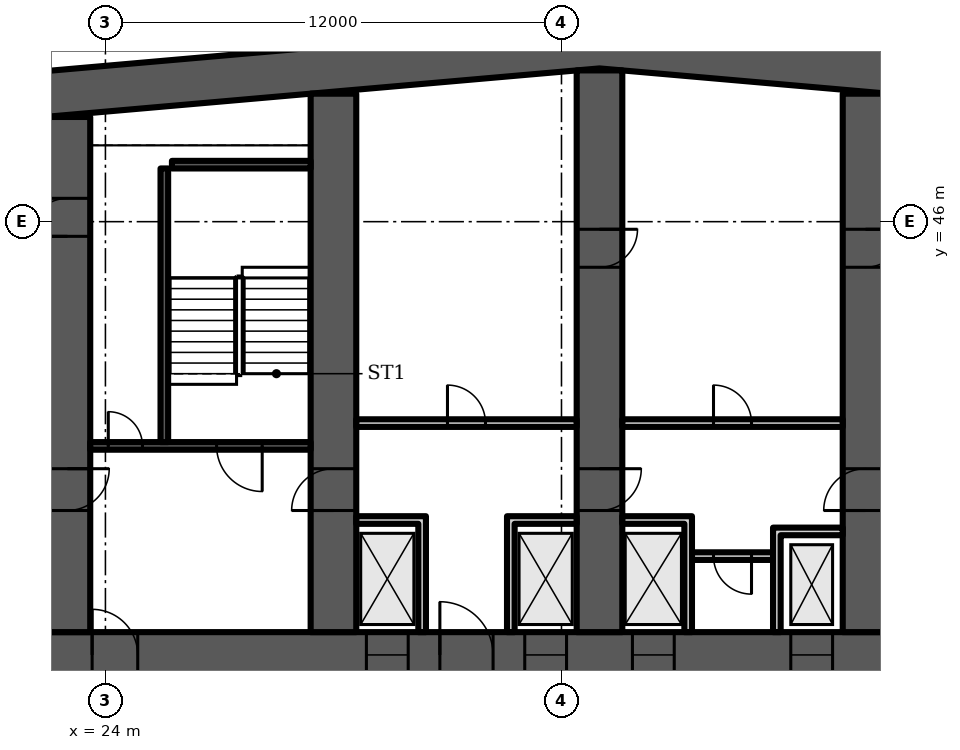
"""IFC4 building model, lengths in metres.
Left out: names, types, materials, properties, quantities, classifications, styles, units other than length and angle.
Written with IfcOpenShell. Run it as: python <this file> out.ifc"""

import sys

from ifc_helpers import new_model, si_unit, direction, frame, frame_2d, origin, place, context, subcontext, project, spatial, polyline, rectangle, outline, extrude, element, fill, save


model = new_model("IFC4")
c1 = context("Model", 3, precision=1e-05, world=origin(), true_north=direction((0.0, 1.0)))
c2 = subcontext(c1, "Body", "Model", "MODEL_VIEW")
j1 = project(units=[si_unit("LENGTHUNIT", "METRE"), si_unit("PLANEANGLEUNIT", "RADIAN")], contexts=[c1])
p1 = place(None, origin())
s1 = spatial("IfcSite", under=j1, at=p1, CompositionType="ELEMENT")
p2 = place(p1, origin())
s2 = spatial("IfcBuilding", under=s1, at=p2, CompositionType="ELEMENT")
p3 = place(p2, frame((0.0, 0.0, 66.7)))
s3 = spatial("IfcBuildingStorey", under=s2, at=p3, CompositionType="ELEMENT", Elevation=66.7)
p4 = place(p3, origin())
e1 = element("IfcWall", 1, at=p4, inside=s3, PredefinedType="SHEAR", context=c2, shape_type="SweptSolid", body=[
    extrude(outline(polyline([(9.0, 47.583), (37.0, 50.032), (65.0, 47.583), (65.0, 48.787), (37.0, 51.237), (9.0, 48.787), (9.0, 47.583)])), origin(), (0.0, 0.0, 1.0), 3.6),
])
p5 = place(p3, frame((9.0, 34.6, 0.0), z_axis=(0.0, 0.0, 1.0), x_axis=(1.0, 0.0, 0.0)))
e2 = element("IfcWall", 2, at=p5, inside=s3, PredefinedType="SHEAR", context=c2, shape_type="SweptSolid", body=[
    extrude(rectangle(XDim=56.0, YDim=1.2, at=frame_2d((28.0, 0.0))), origin(), (0.0, 0.0, 1.0), 3.6),
])
p6 = place(p5, frame((2.0, 0.0, 0.0)))
e3 = element("IfcOpeningElement", 3, at=p6, cuts=e2, PredefinedType="OPENING", context=c2, shape_type="SweptSolid", body=[
    extrude(rectangle(XDim=1.0, YDim=2.1, at=frame_2d((0.5, 1.05))), frame((0.0, 0.61, 0.0), z_axis=(0.0, -1.0, 0.0), x_axis=(1.0, 0.0, 0.0)), (0.0, 0.0, 1.0), 1.22),
])
p7 = place(p5, frame((4.6, 0.0, 0.0)))
e4 = element("IfcOpeningElement", 4, at=p7, cuts=e2, PredefinedType="OPENING", context=c2, shape_type="SweptSolid", body=[
    extrude(rectangle(XDim=1.0, YDim=2.1, at=frame_2d((0.5, 1.05))), frame((0.0, 0.61, 0.0), z_axis=(0.0, -1.0, 0.0), x_axis=(1.0, 0.0, 0.0)), (0.0, 0.0, 1.0), 1.22),
])
p8 = place(p5, frame((7.867, 0.0, 0.0)))
e5 = element("IfcOpeningElement", 5, at=p8, cuts=e2, PredefinedType="OPENING", context=c2, shape_type="SweptSolid", body=[
    extrude(rectangle(XDim=1.1, YDim=2.1, at=frame_2d((0.55, 1.05))), frame((0.0, 0.61, 0.0), z_axis=(0.0, -1.0, 0.0), x_axis=(1.0, 0.0, 0.0)), (0.0, 0.0, 1.0), 1.22),
])
p9 = place(p5, frame((12.033, 0.0, 0.0)))
e6 = element("IfcOpeningElement", 6, at=p9, cuts=e2, PredefinedType="OPENING", context=c2, shape_type="SweptSolid", body=[
    extrude(rectangle(XDim=1.1, YDim=2.1, at=frame_2d((0.55, 1.05))), frame((0.0, 0.61, 0.0), z_axis=(0.0, -1.0, 0.0), x_axis=(1.0, 0.0, 0.0)), (0.0, 0.0, 1.0), 1.22),
])
p10 = place(p5, frame((9.8, 0.0, 0.0)))
e7 = element("IfcOpeningElement", 7, at=p10, cuts=e2, PredefinedType="OPENING", context=c2, shape_type="SweptSolid", body=[
    extrude(rectangle(XDim=1.4, YDim=2.1, at=frame_2d((0.7, 1.05))), frame((0.0, 0.61, 0.0), z_axis=(0.0, -1.0, 0.0), x_axis=(1.0, 0.0, 0.0)), (0.0, 0.0, 1.0), 1.22),
])
p11 = place(p5, frame((14.65, 0.0, 0.0)))
e8 = element("IfcOpeningElement", 8, at=p11, cuts=e2, PredefinedType="OPENING", context=c2, shape_type="SweptSolid", body=[
    extrude(rectangle(XDim=1.2, YDim=2.1, at=frame_2d((0.6, 1.05))), frame((0.0, 0.61, 0.0), z_axis=(0.0, -1.0, 0.0), x_axis=(1.0, 0.0, 0.0)), (0.0, 0.0, 1.0), 1.22),
])
p12 = place(p5, frame((21.867, 0.0, 0.0)))
e9 = element("IfcOpeningElement", 9, at=p12, cuts=e2, PredefinedType="OPENING", context=c2, shape_type="SweptSolid", body=[
    extrude(rectangle(XDim=1.1, YDim=2.1, at=frame_2d((0.55, 1.05))), frame((0.0, 0.61, 0.0), z_axis=(0.0, -1.0, 0.0), x_axis=(1.0, 0.0, 0.0)), (0.0, 0.0, 1.0), 1.22),
])
p13 = place(p5, frame((26.033, 0.0, 0.0)))
e10 = element("IfcOpeningElement", 10, at=p13, cuts=e2, PredefinedType="OPENING", context=c2, shape_type="SweptSolid", body=[
    extrude(rectangle(XDim=1.1, YDim=2.1, at=frame_2d((0.55, 1.05))), frame((0.0, 0.61, 0.0), z_axis=(0.0, -1.0, 0.0), x_axis=(1.0, 0.0, 0.0)), (0.0, 0.0, 1.0), 1.22),
])
p14 = place(p5, frame((23.8, 0.0, 0.0)))
e11 = element("IfcOpeningElement", 11, at=p14, cuts=e2, PredefinedType="OPENING", context=c2, shape_type="SweptSolid", body=[
    extrude(rectangle(XDim=1.4, YDim=2.1, at=frame_2d((0.7, 1.05))), frame((0.0, 0.61, 0.0), z_axis=(0.0, -1.0, 0.0), x_axis=(1.0, 0.0, 0.0)), (0.0, 0.0, 1.0), 1.22),
])
p15 = place(p5, frame((28.867, 0.0, 0.0)))
e12 = element("IfcOpeningElement", 12, at=p15, cuts=e2, PredefinedType="OPENING", context=c2, shape_type="SweptSolid", body=[
    extrude(rectangle(XDim=1.1, YDim=2.1, at=frame_2d((0.55, 1.05))), frame((0.0, 0.61, 0.0), z_axis=(0.0, -1.0, 0.0), x_axis=(1.0, 0.0, 0.0)), (0.0, 0.0, 1.0), 1.22),
])
p16 = place(p5, frame((33.033, 0.0, 0.0)))
e13 = element("IfcOpeningElement", 13, at=p16, cuts=e2, PredefinedType="OPENING", context=c2, shape_type="SweptSolid", body=[
    extrude(rectangle(XDim=1.1, YDim=2.1, at=frame_2d((0.55, 1.05))), frame((0.0, 0.61, 0.0), z_axis=(0.0, -1.0, 0.0), x_axis=(1.0, 0.0, 0.0)), (0.0, 0.0, 1.0), 1.22),
])
p17 = place(p5, frame((40.15, 0.0, 0.0)))
e14 = element("IfcOpeningElement", 14, at=p17, cuts=e2, PredefinedType="OPENING", context=c2, shape_type="SweptSolid", body=[
    extrude(rectangle(XDim=1.2, YDim=2.1, at=frame_2d((0.6, 1.05))), frame((0.0, 0.61, 0.0), z_axis=(0.0, -1.0, 0.0), x_axis=(1.0, 0.0, 0.0)), (0.0, 0.0, 1.0), 1.22),
])
p18 = place(p5, frame((44.8, 0.0, 0.0)))
e15 = element("IfcOpeningElement", 15, at=p18, cuts=e2, PredefinedType="OPENING", context=c2, shape_type="SweptSolid", body=[
    extrude(rectangle(XDim=1.4, YDim=2.1, at=frame_2d((0.7, 1.05))), frame((0.0, 0.61, 0.0), z_axis=(0.0, -1.0, 0.0), x_axis=(1.0, 0.0, 0.0)), (0.0, 0.0, 1.0), 1.22),
])
p19 = place(p5, frame((49.867, 0.0, 0.0)))
e16 = element("IfcOpeningElement", 16, at=p19, cuts=e2, PredefinedType="OPENING", context=c2, shape_type="SweptSolid", body=[
    extrude(rectangle(XDim=1.1, YDim=2.1, at=frame_2d((0.55, 1.05))), frame((0.0, 0.61, 0.0), z_axis=(0.0, -1.0, 0.0), x_axis=(1.0, 0.0, 0.0)), (0.0, 0.0, 1.0), 1.22),
])
p20 = place(p5, frame((53.5, 0.0, 0.0)))
e17 = element("IfcOpeningElement", 17, at=p20, cuts=e2, PredefinedType="OPENING", context=c2, shape_type="SweptSolid", body=[
    extrude(rectangle(XDim=1.1, YDim=2.1, at=frame_2d((0.55, 1.05))), frame((0.0, 0.61, 0.0), z_axis=(0.0, -1.0, 0.0), x_axis=(1.0, 0.0, 0.0)), (0.0, 0.0, 1.0), 1.22),
])
p21 = place(p5, frame((51.567, 0.0, 0.0)))
e18 = element("IfcOpeningElement", 18, at=p21, cuts=e2, PredefinedType="OPENING", context=c2, shape_type="SweptSolid", body=[
    extrude(rectangle(XDim=1.4, YDim=2.1, at=frame_2d((0.7, 1.05))), frame((0.0, 0.61, 0.0), z_axis=(0.0, -1.0, 0.0), x_axis=(1.0, 0.0, 0.0)), (0.0, 0.0, 1.0), 1.22),
])
p22 = place(p3, frame((23.0, 35.2, 0.0), z_axis=(0.0, 0.0, 1.0), x_axis=(0.0, 1.0, 0.0)))
e19 = element("IfcWall", 19, at=p22, inside=s3, PredefinedType="SHEAR", context=c2, shape_type="SweptSolid", body=[
    extrude(rectangle(XDim=13.555, YDim=1.2, at=frame_2d((6.778, 0.0))), origin(), (0.0, 0.0, 1.0), 3.6),
])
p23 = place(p22, frame((10.414, 0.0, 0.0)))
e20 = element("IfcOpeningElement", 20, at=p23, cuts=e19, PredefinedType="OPENING", context=c2, shape_type="SweptSolid", body=[
    extrude(rectangle(XDim=1.0, YDim=2.1, at=frame_2d((0.5, 1.05))), frame((0.0, 0.61, 0.0), z_axis=(0.0, -1.0, 0.0), x_axis=(1.0, 0.0, 0.0)), (0.0, 0.0, 1.0), 1.22),
])
p24 = place(p22, frame((3.2, 0.0, 0.0)))
e21 = element("IfcOpeningElement", 21, at=p24, cuts=e19, PredefinedType="OPENING", context=c2, shape_type="SweptSolid", body=[
    extrude(rectangle(XDim=1.1, YDim=2.1, at=frame_2d((0.55, 1.05))), frame((0.0, 0.61, 0.0), z_axis=(0.0, -1.0, 0.0), x_axis=(1.0, 0.0, 0.0)), (0.0, 0.0, 1.0), 1.22),
])
p25 = place(p3, frame((30.0, 35.2, 0.0), z_axis=(0.0, 0.0, 1.0), x_axis=(0.0, 1.0, 0.0)))
e22 = element("IfcWall", 22, at=p25, inside=s3, PredefinedType="SHEAR", context=c2, shape_type="SweptSolid", body=[
    extrude(rectangle(XDim=14.168, YDim=1.2, at=frame_2d((7.084, 0.0))), origin(), (0.0, 0.0, 1.0), 3.6),
])
p26 = place(p25, frame((3.2, 0.0, 0.0)))
e23 = element("IfcOpeningElement", 23, at=p26, cuts=e22, PredefinedType="OPENING", context=c2, shape_type="SweptSolid", body=[
    extrude(rectangle(XDim=1.1, YDim=2.1, at=frame_2d((0.55, 1.05))), frame((0.0, 0.61, 0.0), z_axis=(0.0, -1.0, 0.0), x_axis=(1.0, 0.0, 0.0)), (0.0, 0.0, 1.0), 1.22),
])
p27 = place(p3, frame((37.0, 35.2, 0.0), z_axis=(0.0, 0.0, 1.0), x_axis=(0.0, 1.0, 0.0)))
e24 = element("IfcWall", 24, at=p27, inside=s3, PredefinedType="SHEAR", context=c2, shape_type="SweptSolid", body=[
    extrude(rectangle(XDim=14.78, YDim=1.2, at=frame_2d((7.39, 0.0))), origin(), (0.0, 0.0, 1.0), 3.6),
])
p28 = place(p27, frame((3.2, 0.0, 0.0)))
e25 = element("IfcOpeningElement", 25, at=p28, cuts=e24, PredefinedType="OPENING", context=c2, shape_type="SweptSolid", body=[
    extrude(rectangle(XDim=1.1, YDim=2.1, at=frame_2d((0.55, 1.05))), frame((0.0, 0.61, 0.0), z_axis=(0.0, -1.0, 0.0), x_axis=(1.0, 0.0, 0.0)), (0.0, 0.0, 1.0), 1.22),
])
p29 = place(p27, frame((9.6, 0.0, 0.0)))
e26 = element("IfcOpeningElement", 26, at=p29, cuts=e24, PredefinedType="OPENING", context=c2, shape_type="SweptSolid", body=[
    extrude(rectangle(XDim=1.0, YDim=2.1, at=frame_2d((0.5, 1.05))), frame((0.0, 0.61, 0.0), z_axis=(0.0, -1.0, 0.0), x_axis=(1.0, 0.0, 0.0)), (0.0, 0.0, 1.0), 1.22),
])
p30 = place(p3, frame((44.0, 35.2, 0.0), z_axis=(0.0, 0.0, 1.0), x_axis=(0.0, 1.0, 0.0)))
e27 = element("IfcWall", 27, at=p30, inside=s3, PredefinedType="SHEAR", context=c2, shape_type="SweptSolid", body=[
    extrude(rectangle(XDim=14.168, YDim=1.2, at=frame_2d((7.084, 0.0))), origin(), (0.0, 0.0, 1.0), 3.6),
])
p31 = place(p30, frame((3.2, 0.0, 0.0)))
e28 = element("IfcOpeningElement", 28, at=p31, cuts=e27, PredefinedType="OPENING", context=c2, shape_type="SweptSolid", body=[
    extrude(rectangle(XDim=1.1, YDim=2.1, at=frame_2d((0.55, 1.05))), frame((0.0, 0.61, 0.0), z_axis=(0.0, -1.0, 0.0), x_axis=(1.0, 0.0, 0.0)), (0.0, 0.0, 1.0), 1.22),
])
p32 = place(p30, frame((9.6, 0.0, 0.0)))
e29 = element("IfcOpeningElement", 29, at=p32, cuts=e27, PredefinedType="OPENING", context=c2, shape_type="SweptSolid", body=[
    extrude(rectangle(XDim=1.0, YDim=2.1, at=frame_2d((0.5, 1.05))), frame((0.0, 0.61, 0.0), z_axis=(0.0, -1.0, 0.0), x_axis=(1.0, 0.0, 0.0)), (0.0, 0.0, 1.0), 1.22),
])
p33 = place(p3, frame((23.6, 40.1, 0.0), z_axis=(0.0, 0.0, 1.0), x_axis=(1.0, 0.0, 0.0)))
e30 = element("IfcWall", 30, at=p33, inside=s3, PredefinedType="SHEAR", context=c2, shape_type="SweptSolid", body=[
    extrude(rectangle(XDim=5.8, YDim=0.2, at=frame_2d((2.9, 0.0))), origin(), (0.0, 0.0, 1.0), 3.2),
])
p34 = place(p33, frame((3.325, 0.0, 0.0)))
e31 = element("IfcOpeningElement", 31, at=p34, cuts=e30, PredefinedType="OPENING", context=c2, shape_type="SweptSolid", body=[
    extrude(rectangle(XDim=1.2, YDim=2.1, at=frame_2d((0.6, 1.05))), frame((0.0, 0.11, 0.0), z_axis=(0.0, -1.0, 0.0), x_axis=(1.0, 0.0, 0.0)), (0.0, 0.0, 1.0), 0.22),
])
p35 = place(p33, frame((0.475, 0.0, 0.0)))
e32 = element("IfcOpeningElement", 32, at=p35, cuts=e30, PredefinedType="OPENING", context=c2, shape_type="SweptSolid", body=[
    extrude(rectangle(XDim=0.9, YDim=2.1, at=frame_2d((0.45, 1.05))), frame((0.0, 0.11, 0.0), z_axis=(0.0, -1.0, 0.0), x_axis=(1.0, 0.0, 0.0)), (0.0, 0.0, 1.0), 0.22),
])
p36 = place(p3, frame((25.55, 40.2, 0.0), z_axis=(0.0, 0.0, 1.0), x_axis=(0.0, 1.0, 0.0)))
e33 = element("IfcWall", 33, at=p36, inside=s3, PredefinedType="SHEAR", context=c2, shape_type="SweptSolid", body=[
    extrude(rectangle(XDim=7.2, YDim=0.2, at=frame_2d((3.6, 0.0))), origin(), (0.0, 0.0, 1.0), 3.2),
])
p37 = place(p3, frame((25.75, 47.5, 0.0), z_axis=(0.0, 0.0, 1.0), x_axis=(1.0, 0.0, 0.0)))
e34 = element("IfcWall", 34, at=p37, inside=s3, PredefinedType="SHEAR", context=c2, shape_type="SweptSolid", body=[
    extrude(rectangle(XDim=3.65, YDim=0.2, at=frame_2d((1.825, 0.0))), origin(), (0.0, 0.0, 1.0), 3.2),
])
p38 = place(p3, frame((30.6, 40.7, 0.0), z_axis=(0.0, 0.0, 1.0), x_axis=(1.0, 0.0, 0.0)))
e35 = element("IfcWall", 35, at=p38, inside=s3, PredefinedType="PARTITIONING", context=c2, shape_type="SweptSolid", body=[
    extrude(rectangle(XDim=5.8, YDim=0.2, at=frame_2d((2.9, 0.0))), origin(), (0.0, 0.0, 1.0), 3.2),
])
p39 = place(p38, frame((2.4, 0.0, 0.0)))
e36 = element("IfcOpeningElement", 36, at=p39, cuts=e35, PredefinedType="OPENING", context=c2, shape_type="SweptSolid", body=[
    extrude(rectangle(XDim=1.0, YDim=2.1, at=frame_2d((0.5, 1.05))), frame((0.0, 0.11, 0.0), z_axis=(0.0, -1.0, 0.0), x_axis=(1.0, 0.0, 0.0)), (0.0, 0.0, 1.0), 0.22),
])
p40 = place(p3, frame((0.0, 0.0, -0.0)))
e37 = element("IfcWall", 37, at=p40, inside=s3, PredefinedType="PARTITIONING", context=c2, shape_type="SweptSolid", body=[
    extrude(outline(polyline([(32.233, 38.05), (30.6, 38.05), (30.6, 38.25), (32.233, 38.25), (32.433, 38.25), (32.433, 35.2), (32.233, 35.2), (32.233, 38.05)])), origin(), (0.0, 0.0, 1.0), 3.2),
])
p41 = place(p3, frame((0.0, 0.0, -0.0)))
e38 = element("IfcWall", 38, at=p41, inside=s3, PredefinedType="PARTITIONING", context=c2, shape_type="SweptSolid", body=[
    extrude(outline(polyline([(34.567, 38.25), (34.767, 38.25), (36.4, 38.25), (36.4, 38.05), (34.767, 38.05), (34.767, 35.2), (34.567, 35.2), (34.567, 38.25)])), origin(), (0.0, 0.0, 1.0), 3.2),
])
p42 = place(p3, frame((39.433, 37.2, 0.0), z_axis=(0.0, 0.0, 1.0), x_axis=(1.0, 0.0, 0.0)))
e39 = element("IfcWall", 39, at=p42, inside=s3, PredefinedType="PARTITIONING", context=c2, shape_type="SweptSolid", body=[
    extrude(rectangle(XDim=2.133, YDim=0.2, at=frame_2d((1.067, 0.0))), origin(), (0.0, 0.0, 1.0), 3.2),
])
p43 = place(p42, frame((0.567, 0.0, 0.0)))
e40 = element("IfcOpeningElement", 40, at=p43, cuts=e39, PredefinedType="OPENING", context=c2, shape_type="SweptSolid", body=[
    extrude(rectangle(XDim=1.0, YDim=2.1, at=frame_2d((0.5, 1.05))), frame((0.0, 0.11, 0.0), z_axis=(0.0, -1.0, 0.0), x_axis=(1.0, 0.0, 0.0)), (0.0, 0.0, 1.0), 0.22),
])
p44 = place(p3, frame((37.6, 40.7, 0.0), z_axis=(0.0, 0.0, 1.0), x_axis=(1.0, 0.0, 0.0)))
e41 = element("IfcWall", 41, at=p44, inside=s3, PredefinedType="PARTITIONING", context=c2, shape_type="SweptSolid", body=[
    extrude(rectangle(XDim=5.8, YDim=0.2, at=frame_2d((2.9, 0.0))), origin(), (0.0, 0.0, 1.0), 3.2),
])
p45 = place(p44, frame((2.4, 0.0, 0.0)))
e42 = element("IfcOpeningElement", 42, at=p45, cuts=e41, PredefinedType="OPENING", context=c2, shape_type="SweptSolid", body=[
    extrude(rectangle(XDim=1.0, YDim=2.1, at=frame_2d((0.5, 1.05))), frame((0.0, 0.11, 0.0), z_axis=(0.0, -1.0, 0.0), x_axis=(1.0, 0.0, 0.0)), (0.0, 0.0, 1.0), 0.22),
])
p46 = place(p3, frame((0.0, 0.0, -0.0)))
e43 = element("IfcWall", 43, at=p46, inside=s3, PredefinedType="PARTITIONING", context=c2, shape_type="SweptSolid", body=[
    extrude(outline(polyline([(41.567, 37.95), (41.767, 37.95), (43.4, 37.95), (43.4, 37.75), (41.767, 37.75), (41.767, 35.2), (41.567, 35.2), (41.567, 37.95)])), origin(), (0.0, 0.0, 1.0), 3.2),
])
p47 = place(p3, frame((0.0, 0.0, -0.0)))
e44 = element("IfcWall", 44, at=p47, inside=s3, PredefinedType="PARTITIONING", context=c2, shape_type="SweptSolid", body=[
    extrude(outline(polyline([(39.233, 38.05), (37.6, 38.05), (37.6, 38.25), (39.233, 38.25), (39.433, 38.25), (39.433, 35.2), (39.233, 35.2), (39.233, 38.05)])), origin(), (0.0, 0.0, 1.0), 3.2),
])
p48 = place(p23, origin())
e45 = element("IfcDoor", 45, at=p48, inside=s3, OperationType="SINGLE_SWING_LEFT", PredefinedType="DOOR", context=c2, shape_type="SweptSolid", body=[
    extrude(rectangle(XDim=1.0, YDim=2.1, at=frame_2d((0.5, 1.05))), frame((0.0, 0.6, 0.0), z_axis=(0.0, -1.0, 0.0), x_axis=(1.0, 0.0, 0.0)), (0.0, 0.0, 1.0), 1.199),
])
fill(e20, e45)
p49 = place(p34, origin())
e46 = element("IfcDoor", 46, at=p49, inside=s3, OperationType="SINGLE_SWING_RIGHT", PredefinedType="DOOR", context=c2, shape_type="SweptSolid", body=[
    extrude(rectangle(XDim=1.2, YDim=2.1, at=frame_2d((0.6, 1.05))), frame((0.0, 0.025, 0.0), z_axis=(0.0, -1.0, 0.0), x_axis=(1.0, 0.0, 0.0)), (0.0, 0.0, 1.0), 0.05),
])
fill(e31, e46)
p50 = place(p35, origin())
e47 = element("IfcDoor", 47, at=p50, inside=s3, OperationType="SINGLE_SWING_LEFT", PredefinedType="DOOR", context=c2, shape_type="SweptSolid", body=[
    extrude(rectangle(XDim=0.9, YDim=2.1, at=frame_2d((0.45, 1.05))), frame((0.0, 0.025, 0.0), z_axis=(0.0, -1.0, 0.0), x_axis=(1.0, 0.0, 0.0)), (0.0, 0.0, 1.0), 0.05),
])
fill(e32, e47)
p51 = place(p11, origin())
e48 = element("IfcDoor", 48, at=p51, inside=s3, OperationType="SINGLE_SWING_LEFT", PredefinedType="DOOR", context=c2, shape_type="SweptSolid", body=[
    extrude(rectangle(XDim=1.2, YDim=2.1, at=frame_2d((0.6, 1.05))), frame((0.0, 0.025, 0.0), z_axis=(0.0, -1.0, 0.0), x_axis=(1.0, 0.0, 0.0)), (0.0, 0.0, 1.0), 0.05),
])
fill(e8, e48)
p52 = place(p12, origin())
e49 = element("IfcDoor", 49, at=p52, inside=s3, OperationType="DOUBLE_DOOR_SLIDING", PredefinedType="DOOR", context=c2, shape_type="SweptSolid", body=[
    extrude(rectangle(XDim=1.1, YDim=2.1, at=frame_2d((0.55, 1.05))), frame((0.0, 0.025, 0.0), z_axis=(0.0, -1.0, 0.0), x_axis=(1.0, 0.0, 0.0)), (0.0, 0.0, 1.0), 0.05),
])
fill(e9, e49)
p53 = place(p13, origin())
e50 = element("IfcDoor", 50, at=p53, inside=s3, OperationType="DOUBLE_DOOR_SLIDING", PredefinedType="DOOR", context=c2, shape_type="SweptSolid", body=[
    extrude(rectangle(XDim=1.1, YDim=2.1, at=frame_2d((0.55, 1.05))), frame((0.0, 0.025, 0.0), z_axis=(0.0, -1.0, 0.0), x_axis=(1.0, 0.0, 0.0)), (0.0, 0.0, 1.0), 0.05),
])
fill(e10, e50)
p54 = place(p14, origin())
e51 = element("IfcDoor", 51, at=p54, inside=s3, OperationType="DOUBLE_DOOR_SINGLE_SWING", PredefinedType="DOOR", context=c2, shape_type="SweptSolid", body=[
    extrude(rectangle(XDim=1.4, YDim=2.1, at=frame_2d((0.7, 1.05))), frame((0.0, 0.025, 0.0), z_axis=(0.0, -1.0, 0.0), x_axis=(1.0, 0.0, 0.0)), (0.0, 0.0, 1.0), 0.05),
])
fill(e11, e51)
p55 = place(p39, origin())
e52 = element("IfcDoor", 52, at=p55, inside=s3, OperationType="SINGLE_SWING_LEFT", PredefinedType="DOOR", context=c2, shape_type="SweptSolid", body=[
    extrude(rectangle(XDim=1.0, YDim=2.1, at=frame_2d((0.5, 1.05))), frame((0.0, 0.025, 0.0), z_axis=(0.0, -1.0, 0.0), x_axis=(1.0, 0.0, 0.0)), (0.0, 0.0, 1.0), 0.05),
])
fill(e36, e52)
p56 = place(p43, origin())
e53 = element("IfcDoor", 53, at=p56, inside=s3, OperationType="SINGLE_SWING_RIGHT", PredefinedType="DOOR", context=c2, shape_type="SweptSolid", body=[
    extrude(rectangle(XDim=1.0, YDim=2.1, at=frame_2d((0.5, 1.05))), frame((0.0, 0.025, 0.0), z_axis=(0.0, -1.0, 0.0), x_axis=(1.0, 0.0, 0.0)), (0.0, 0.0, 1.0), 0.05),
])
fill(e40, e53)
p57 = place(p15, origin())
e54 = element("IfcDoor", 54, at=p57, inside=s3, OperationType="DOUBLE_DOOR_SLIDING", PredefinedType="DOOR", context=c2, shape_type="SweptSolid", body=[
    extrude(rectangle(XDim=1.1, YDim=2.1, at=frame_2d((0.55, 1.05))), frame((0.0, 0.025, 0.0), z_axis=(0.0, -1.0, 0.0), x_axis=(1.0, 0.0, 0.0)), (0.0, 0.0, 1.0), 0.05),
])
fill(e12, e54)
p58 = place(p16, origin())
e55 = element("IfcDoor", 55, at=p58, inside=s3, OperationType="DOUBLE_DOOR_SLIDING", PredefinedType="DOOR", context=c2, shape_type="SweptSolid", body=[
    extrude(rectangle(XDim=1.1, YDim=2.1, at=frame_2d((0.55, 1.05))), frame((0.0, 0.025, 0.0), z_axis=(0.0, -1.0, 0.0), x_axis=(1.0, 0.0, 0.0)), (0.0, 0.0, 1.0), 0.05),
])
fill(e13, e55)
p59 = place(p45, origin())
e56 = element("IfcDoor", 56, at=p59, inside=s3, OperationType="SINGLE_SWING_LEFT", PredefinedType="DOOR", context=c2, shape_type="SweptSolid", body=[
    extrude(rectangle(XDim=1.0, YDim=2.1, at=frame_2d((0.5, 1.05))), frame((0.0, 0.025, 0.0), z_axis=(0.0, -1.0, 0.0), x_axis=(1.0, 0.0, 0.0)), (0.0, 0.0, 1.0), 0.05),
])
fill(e42, e56)
p60 = place(p24, origin())
e57 = element("IfcDoor", 57, at=p60, inside=s3, OperationType="SINGLE_SWING_RIGHT", PredefinedType="DOOR", context=c2, shape_type="SweptSolid", body=[
    extrude(rectangle(XDim=1.1, YDim=2.1, at=frame_2d((0.55, 1.05))), frame((0.0, 0.025, 0.0), z_axis=(0.0, -1.0, 0.0), x_axis=(1.0, 0.0, 0.0)), (0.0, 0.0, 1.0), 0.05),
])
fill(e21, e57)
p61 = place(p26, origin())
e58 = element("IfcDoor", 58, at=p61, inside=s3, OperationType="SINGLE_SWING_LEFT", PredefinedType="DOOR", context=c2, shape_type="SweptSolid", body=[
    extrude(rectangle(XDim=1.1, YDim=2.1, at=frame_2d((0.55, 1.05))), frame((0.0, 0.025, 0.0), z_axis=(0.0, -1.0, 0.0), x_axis=(1.0, 0.0, 0.0)), (0.0, 0.0, 1.0), 0.05),
])
fill(e23, e58)
p62 = place(p28, origin())
e59 = element("IfcDoor", 59, at=p62, inside=s3, OperationType="SINGLE_SWING_RIGHT", PredefinedType="DOOR", context=c2, shape_type="SweptSolid", body=[
    extrude(rectangle(XDim=1.1, YDim=2.1, at=frame_2d((0.55, 1.05))), frame((0.0, 0.025, 0.0), z_axis=(0.0, -1.0, 0.0), x_axis=(1.0, 0.0, 0.0)), (0.0, 0.0, 1.0), 0.05),
])
fill(e25, e59)
p63 = place(p29, origin())
e60 = element("IfcDoor", 60, at=p63, inside=s3, OperationType="SINGLE_SWING_RIGHT", PredefinedType="DOOR", context=c2, shape_type="SweptSolid", body=[
    extrude(rectangle(XDim=1.0, YDim=2.1, at=frame_2d((0.5, 1.05))), frame((0.0, 0.6, 0.0), z_axis=(0.0, -1.0, 0.0), x_axis=(1.0, 0.0, 0.0)), (0.0, 0.0, 1.0), 1.199),
])
fill(e26, e60)
p64 = place(p31, origin())
e61 = element("IfcDoor", 61, at=p64, inside=s3, OperationType="SINGLE_SWING_LEFT", PredefinedType="DOOR", context=c2, shape_type="SweptSolid", body=[
    extrude(rectangle(XDim=1.1, YDim=2.1, at=frame_2d((0.55, 1.05))), frame((0.0, 0.025, 0.0), z_axis=(0.0, -1.0, 0.0), x_axis=(1.0, 0.0, 0.0)), (0.0, 0.0, 1.0), 0.05),
])
fill(e28, e61)
p65 = place(p32, origin())
e62 = element("IfcDoor", 62, at=p65, inside=s3, OperationType="SINGLE_SWING_RIGHT", PredefinedType="DOOR", context=c2, shape_type="SweptSolid", body=[
    extrude(rectangle(XDim=1.0, YDim=2.1, at=frame_2d((0.5, 1.05))), frame((0.0, 0.6, 0.0), z_axis=(0.0, -1.0, 0.0), x_axis=(1.0, 0.0, 0.0)), (0.0, 0.0, 1.0), 1.199),
])
fill(e29, e62)
save(model, sys.argv[1])
